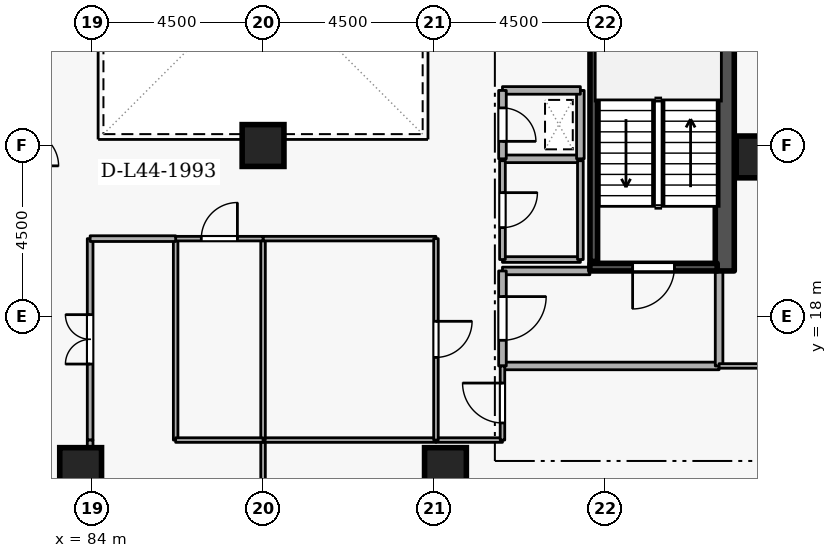
"""IFC4 building model, lengths in metres.
Left out: names, types, materials, properties, quantities, classifications, styles, units other than length and angle.
Written with IfcOpenShell. Run it as: python <this file> out.ifc"""

import sys

from ifc_helpers import new_model, si_unit, direction, frame, frame_2d, origin, origin_2d, place, context, subcontext, project, spatial, rectangle, extrude, element, fill, save


model = new_model("IFC4")
c1 = context("Model", 3, precision=1e-05, world=origin(), true_north=direction((0.0, 1.0)))
c2 = subcontext(c1, "Body", "Model", "MODEL_VIEW")
j1 = project(units=[si_unit("LENGTHUNIT", "METRE"), si_unit("PLANEANGLEUNIT", "RADIAN")], contexts=[c1])
p1 = place(None, origin())
s1 = spatial("IfcSite", under=j1, at=p1, CompositionType="ELEMENT")
p2 = place(p1, origin())
s2 = spatial("IfcBuilding", under=s1, at=p2, CompositionType="ELEMENT")
p3 = place(p2, frame((0.0, 0.0, 167.1)))
s3 = spatial("IfcBuildingStorey", under=s2, at=p3, CompositionType="ELEMENT", Elevation=167.1)
p4 = place(p3, frame((100.65, 19.2, 0.0), z_axis=(0.0, 0.0, 1.0), x_axis=(0.0, 1.0, 0.0)))
e1 = element("IfcWall", 1, at=p4, inside=s3, PredefinedType="SHEAR", context=c2, shape_type="SweptSolid", body=[
    extrude(rectangle(XDim=15.6, YDim=0.5, at=frame_2d((7.8, 0.0))), origin(), (0.0, 0.0, 1.0), 3.6),
])
for number, where, z_axis, x_axis in (
    (2, (93.3, 14.0, 0.0), (0.0, 0.0, 1.0), (1.0, 0.0, 0.0)),
    (3, (83.7, 14.0, 0.0), (0.0, 0.0, 1.0), (1.0, 0.0, 0.0)),
    (4, (101.5, 22.2, 0.0), (0.0, 0.0, 1.0), (1.0, 0.0, 0.0)),
    (5, (88.5, 22.5, 0.0), (0.0, 0.0, 1.0), (1.0, 0.0, 0.0)),
):
    element("IfcColumn", number, at=place(p3, frame(where, z_axis=z_axis, x_axis=x_axis)), inside=s3, PredefinedType="COLUMN", context=c2, shape_type="SweptSolid", body=[
        extrude(rectangle(XDim=1.1, YDim=1.1, at=origin_2d()), origin(), (0.0, 0.0, 1.0), 3.6),
    ])
p5 = place(p3, frame((100.45, 19.3, 0.0), z_axis=(0.0, 0.0, 1.0), x_axis=(-1.0, 0.0, 0.0)))
e6 = element("IfcWall", 6, at=p5, inside=s3, PredefinedType="SHEAR", context=c2, shape_type="SweptSolid", body=[
    extrude(rectangle(XDim=3.35, YDim=0.2, at=frame_2d((1.675, 0.0))), origin(), (0.0, 0.0, 1.0), 3.6),
])
p6 = place(p5, frame((1.125, 0.0, 0.0)))
e7 = element("IfcOpeningElement", 7, at=p6, cuts=e6, PredefinedType="OPENING", context=c2, shape_type="SweptSolid", body=[
    extrude(rectangle(XDim=1.1, YDim=2.1, at=frame_2d((0.55, 1.05))), frame((0.0, 0.11, 0.0), z_axis=(0.0, -1.0, 0.0), x_axis=(1.0, 0.0, 0.0)), (0.0, 0.0, 1.0), 0.22),
])
p7 = place(p3, frame((97.203, 26.55, 0.0), z_axis=(0.0, 0.0, 1.0), x_axis=(0.0, -1.0, 0.0)))
e8 = element("IfcWall", 8, at=p7, inside=s3, PredefinedType="SHEAR", context=c2, shape_type="SweptSolid", body=[
    extrude(rectangle(XDim=7.1, YDim=0.2, at=frame_2d((3.55, 0.0))), origin(), (0.0, 0.0, 1.0), 3.6),
])
p8 = place(p3, frame((94.8, 16.7, 0.0), z_axis=(0.0, 0.0, 1.0), x_axis=(1.0, 0.0, 0.0)))
e9 = element("IfcWall", 9, at=p8, inside=s3, PredefinedType="STANDARD", context=c2, shape_type="SweptSolid", body=[
    extrude(rectangle(XDim=5.7, YDim=0.2, at=frame_2d((2.85, 0.0))), origin(), (0.0, 0.0, 1.0), 3.34),
])
p9 = place(p3, frame((100.5, 16.7, 0.0), z_axis=(0.0, 0.0, 1.0), x_axis=(0.0, 1.0, 0.0)))
e10 = element("IfcWall", 10, at=p9, inside=s3, PredefinedType="STANDARD", context=c2, shape_type="SweptSolid", body=[
    extrude(rectangle(XDim=2.5, YDim=0.2, at=frame_2d((1.25, 0.0))), origin(), (0.0, 0.0, 1.0), 3.34),
])
p10 = place(p3, frame((97.1, 19.2, 0.0), z_axis=(0.0, 0.0, 1.0), x_axis=(-1.0, 0.0, 0.0)))
e11 = element("IfcWall", 11, at=p10, inside=s3, PredefinedType="STANDARD", context=c2, shape_type="SweptSolid", body=[
    extrude(rectangle(XDim=2.3, YDim=0.2, at=frame_2d((1.15, 0.0))), origin(), (0.0, 0.0, 1.0), 2.545),
])
p11 = place(p3, frame((94.8, 19.2, 0.0), z_axis=(0.0, 0.0, 1.0), x_axis=(0.0, -1.0, 0.0)))
e12 = element("IfcWall", 12, at=p11, inside=s3, PredefinedType="STANDARD", context=c2, shape_type="SweptSolid", body=[
    extrude(rectangle(XDim=2.5, YDim=0.2, at=frame_2d((1.25, 0.0))), origin(), (0.0, 0.0, 1.0), 3.34),
])
p12 = place(p11, frame((0.675, 0.0, 0.0)))
e13 = element("IfcOpeningElement", 13, at=p12, cuts=e12, PredefinedType="OPENING", context=c2, shape_type="SweptSolid", body=[
    extrude(rectangle(XDim=1.15, YDim=2.1, at=frame_2d((0.575, 1.05))), frame((0.0, 0.11, 0.0), z_axis=(0.0, -1.0, 0.0), x_axis=(1.0, 0.0, 0.0)), (0.0, 0.0, 1.0), 0.22),
])
p13 = place(p3, frame((94.8, 22.15, 0.0), z_axis=(0.0, 0.0, 1.0), x_axis=(1.0, 0.0, 0.0)))
e14 = element("IfcWall", 14, at=p13, inside=s3, PredefinedType="STANDARD", context=c2, shape_type="SweptSolid", body=[
    extrude(rectangle(XDim=2.05, YDim=0.2, at=frame_2d((1.025, 0.0))), origin(), (0.0, 0.0, 1.0), 3.34),
])
p14 = place(p3, frame((96.85, 22.15, 0.0), z_axis=(0.0, 0.0, 1.0), x_axis=(0.0, 1.0, 0.0)))
e15 = element("IfcWall", 15, at=p14, inside=s3, PredefinedType="STANDARD", context=c2, shape_type="SweptSolid", body=[
    extrude(rectangle(XDim=1.8, YDim=0.2, at=frame_2d((0.9, 0.0))), origin(), (0.0, 0.0, 1.0), 3.34),
])
p15 = place(p3, frame((96.85, 23.95, 0.0), z_axis=(0.0, 0.0, 1.0), x_axis=(-1.0, 0.0, 0.0)))
e16 = element("IfcWall", 16, at=p15, inside=s3, PredefinedType="STANDARD", context=c2, shape_type="SweptSolid", body=[
    extrude(rectangle(XDim=2.05, YDim=0.2, at=frame_2d((1.025, 0.0))), origin(), (0.0, 0.0, 1.0), 3.34),
])
p16 = place(p3, frame((94.8, 23.95, 0.0), z_axis=(0.0, 0.0, 1.0), x_axis=(0.0, -1.0, 0.0)))
e17 = element("IfcWall", 17, at=p16, inside=s3, PredefinedType="STANDARD", context=c2, shape_type="SweptSolid", body=[
    extrude(rectangle(XDim=1.8, YDim=0.2, at=frame_2d((0.9, 0.0))), origin(), (0.0, 0.0, 1.0), 3.34),
])
p17 = place(p16, frame((0.46, 0.0, 0.0)))
e18 = element("IfcOpeningElement", 18, at=p17, cuts=e17, PredefinedType="OPENING", context=c2, shape_type="SweptSolid", body=[
    extrude(rectangle(XDim=0.88, YDim=2.04, at=frame_2d((0.44, 1.02))), frame((0.0, 0.11, 0.0), z_axis=(0.0, -1.0, 0.0), x_axis=(1.0, 0.0, 0.0)), (0.0, 0.0, 1.0), 0.22),
])
p18 = place(p3, frame((94.8, 19.5, 0.0), z_axis=(0.0, 0.0, 1.0), x_axis=(1.0, 0.0, 0.0)))
e19 = element("IfcWall", 19, at=p18, inside=s3, PredefinedType="PARTITIONING", context=c2, shape_type="SweptSolid", body=[
    extrude(rectangle(XDim=2.05, YDim=0.15, at=frame_2d((1.025, 0.0))), origin(), (0.0, 0.0, 1.0), 2.545),
])
p19 = place(p3, frame((96.85, 19.5, 0.0), z_axis=(0.0, 0.0, 1.0), x_axis=(0.0, 1.0, 0.0)))
e20 = element("IfcWall", 20, at=p19, inside=s3, PredefinedType="PARTITIONING", context=c2, shape_type="SweptSolid", body=[
    extrude(rectangle(XDim=2.6, YDim=0.15, at=frame_2d((1.3, 0.0))), origin(), (0.0, 0.0, 1.0), 3.34),
])
p20 = place(p3, frame((94.8, 22.1, 0.0), z_axis=(0.0, 0.0, 1.0), x_axis=(0.0, -1.0, 0.0)))
e21 = element("IfcWall", 21, at=p20, inside=s3, PredefinedType="PARTITIONING", context=c2, shape_type="SweptSolid", body=[
    extrude(rectangle(XDim=2.6, YDim=0.15, at=frame_2d((1.3, 0.0))), origin(), (0.0, 0.0, 1.0), 3.34),
])
p21 = place(p20, frame((0.84, 0.0, 0.0)))
e22 = element("IfcOpeningElement", 22, at=p21, cuts=e21, PredefinedType="OPENING", context=c2, shape_type="SweptSolid", body=[
    extrude(rectangle(XDim=0.92, YDim=2.08, at=frame_2d((0.46, 1.04))), frame((0.0, 0.085, 0.0), z_axis=(0.0, -1.0, 0.0), x_axis=(1.0, 0.0, 0.0)), (0.0, 0.0, 1.0), 0.17),
])
p22 = place(p3, frame((88.5, 9.28, 0.0), z_axis=(0.0, 0.0, 1.0), x_axis=(0.0, 1.0, 0.0)))
e23 = element("IfcWall", 23, at=p22, inside=s3, PredefinedType="PARTITIONING", context=c2, shape_type="SweptSolid", body=[
    extrude(rectangle(XDim=5.47, YDim=0.12, at=frame_2d((2.735, 0.0))), origin(), (0.0, 0.0, 1.0), 2.882),
])
p23 = place(p3, frame((88.5, 14.75, 0.0), z_axis=(0.0, 0.0, 1.0), x_axis=(1.0, 0.0, 0.0)))
e24 = element("IfcWall", 24, at=p23, inside=s3, PredefinedType="PARTITIONING", context=c2, shape_type="SweptSolid", body=[
    extrude(rectangle(XDim=4.55, YDim=0.12, at=frame_2d((2.275, 0.0))), origin(), (0.0, 0.0, 1.0), 3.34),
])
p24 = place(p3, frame((93.05, 14.75, 0.0), z_axis=(0.0, 0.0, 1.0), x_axis=(1.0, 0.0, 0.0)))
e25 = element("IfcWall", 25, at=p24, inside=s3, PredefinedType="PARTITIONING", context=c2, shape_type="SweptSolid", body=[
    extrude(rectangle(XDim=1.75, YDim=0.12, at=frame_2d((0.875, 0.0))), origin(), (0.0, 0.0, 1.0), 3.34),
])
p25 = place(p3, frame((94.8, 14.75, 0.0), z_axis=(0.0, 0.0, 1.0), x_axis=(0.0, 1.0, 0.0)))
e26 = element("IfcWall", 26, at=p25, inside=s3, PredefinedType="PARTITIONING", context=c2, shape_type="SweptSolid", body=[
    extrude(rectangle(XDim=1.95, YDim=0.12, at=frame_2d((0.975, 0.0))), origin(), (0.0, 0.0, 1.0), 3.34),
])
p26 = place(p25, frame((0.45, 0.0, 0.0)))
e27 = element("IfcOpeningElement", 27, at=p26, cuts=e26, PredefinedType="OPENING", context=c2, shape_type="SweptSolid", body=[
    extrude(rectangle(XDim=1.05, YDim=2.1, at=frame_2d((0.525, 1.05))), frame((0.0, 0.07, 0.0), z_axis=(0.0, -1.0, 0.0), x_axis=(1.0, 0.0, 0.0)), (0.0, 0.0, 1.0), 0.14),
])
p27 = place(p3, frame((100.5, 16.7, 0.0), z_axis=(0.0, 0.0, 1.0), x_axis=(1.0, 0.0, 0.0)))
e28 = element("IfcWall", 28, at=p27, inside=s3, PredefinedType="PARTITIONING", context=c2, shape_type="SweptSolid", body=[
    extrude(rectangle(XDim=11.72, YDim=0.12, at=frame_2d((5.86, 0.0))), origin(), (0.0, 0.0, 1.0), 3.34),
])
p28 = place(p3, frame((88.5, 14.75, 0.0), z_axis=(0.0, 0.0, 1.0), x_axis=(0.0, 1.0, 0.0)))
e29 = element("IfcWall", 29, at=p28, inside=s3, PredefinedType="PARTITIONING", context=c2, shape_type="SweptSolid", body=[
    extrude(rectangle(XDim=5.3, YDim=0.12, at=frame_2d((2.65, 0.0))), origin(), (0.0, 0.0, 1.0), 2.882),
])
p29 = place(p3, frame((88.5, 20.05, 0.0), z_axis=(0.0, 0.0, 1.0), x_axis=(1.0, 0.0, 0.0)))
e30 = element("IfcWall", 30, at=p29, inside=s3, PredefinedType="PARTITIONING", context=c2, shape_type="SweptSolid", body=[
    extrude(rectangle(XDim=4.55, YDim=0.12, at=frame_2d((2.275, 0.0))), origin(), (0.0, 0.0, 1.0), 3.34),
])
p30 = place(p3, frame((93.05, 20.05, 0.0), z_axis=(0.0, 0.0, 1.0), x_axis=(0.0, -1.0, 0.0)))
e31 = element("IfcWall", 31, at=p30, inside=s3, PredefinedType="PARTITIONING", context=c2, shape_type="SweptSolid", body=[
    extrude(rectangle(XDim=5.3, YDim=0.12, at=frame_2d((2.65, 0.0))), origin(), (0.0, 0.0, 1.0), 3.34),
])
p31 = place(p30, frame((2.175, 0.0, 0.0)))
e32 = element("IfcOpeningElement", 32, at=p31, cuts=e31, PredefinedType="OPENING", context=c2, shape_type="SweptSolid", body=[
    extrude(rectangle(XDim=0.95, YDim=2.1, at=frame_2d((0.475, 1.05))), frame((0.0, 0.07, 0.0), z_axis=(0.0, -1.0, 0.0), x_axis=(1.0, 0.0, 0.0)), (0.0, 0.0, 1.0), 0.14),
])
p32 = place(p3, frame((86.2, 14.75, 0.0), z_axis=(0.0, 0.0, 1.0), x_axis=(0.0, 1.0, 0.0)))
e33 = element("IfcWall", 33, at=p32, inside=s3, PredefinedType="PARTITIONING", context=c2, shape_type="SweptSolid", body=[
    extrude(rectangle(XDim=5.3, YDim=0.12, at=frame_2d((2.65, 0.0))), origin(), (0.0, 0.0, 1.0), 3.34),
])
p33 = place(p3, frame((86.2, 20.05, 0.0), z_axis=(0.0, 0.0, 1.0), x_axis=(1.0, 0.0, 0.0)))
e34 = element("IfcWall", 34, at=p33, inside=s3, PredefinedType="PARTITIONING", context=c2, shape_type="SweptSolid", body=[
    extrude(rectangle(XDim=2.3, YDim=0.12, at=frame_2d((1.15, 0.0))), origin(), (0.0, 0.0, 1.0), 3.34),
])
p34 = place(p33, frame((0.675, 0.0, 0.0)))
e35 = element("IfcOpeningElement", 35, at=p34, cuts=e34, PredefinedType="OPENING", context=c2, shape_type="SweptSolid", body=[
    extrude(rectangle(XDim=0.95, YDim=2.1, at=frame_2d((0.475, 1.05))), frame((0.0, 0.07, 0.0), z_axis=(0.0, -1.0, 0.0), x_axis=(1.0, 0.0, 0.0)), (0.0, 0.0, 1.0), 0.14),
])
p35 = place(p3, frame((88.5, 14.75, 0.0), z_axis=(0.0, 0.0, 1.0), x_axis=(-1.0, 0.0, 0.0)))
e36 = element("IfcWall", 36, at=p35, inside=s3, PredefinedType="PARTITIONING", context=c2, shape_type="SweptSolid", body=[
    extrude(rectangle(XDim=2.3, YDim=0.12, at=frame_2d((1.15, 0.0))), origin(), (0.0, 0.0, 1.0), 3.34),
])
p36 = place(p3, frame((83.95, 14.75, 0.0), z_axis=(0.0, 0.0, 1.0), x_axis=(0.0, 1.0, 0.0)))
e37 = element("IfcWall", 37, at=p36, inside=s3, PredefinedType="PARTITIONING", context=c2, shape_type="SweptSolid", body=[
    extrude(rectangle(XDim=5.3, YDim=0.15, at=frame_2d((2.65, 0.0))), origin(), (0.0, 0.0, 1.0), 3.34),
])
p37 = place(p36, frame((2.0, 0.0, 0.0)))
e38 = element("IfcOpeningElement", 38, at=p37, cuts=e37, PredefinedType="OPENING", context=c2, shape_type="SweptSolid", body=[
    extrude(rectangle(XDim=1.3, YDim=2.12, at=frame_2d((0.65, 1.06))), frame((0.0, 0.085, 0.0), z_axis=(0.0, -1.0, 0.0), x_axis=(1.0, 0.0, 0.0)), (0.0, 0.0, 1.0), 0.17),
])
p38 = place(p3, frame((83.95, 20.05, 0.0), z_axis=(0.0, 0.0, 1.0), x_axis=(1.0, 0.0, 0.0)))
e39 = element("IfcWall", 39, at=p38, inside=s3, PredefinedType="PARTITIONING", context=c2, shape_type="SweptSolid", body=[
    extrude(rectangle(XDim=2.25, YDim=0.15, at=frame_2d((1.125, 0.0))), origin(), (0.0, 0.0, 1.0), 3.34),
])
p39 = place(p3, frame((83.95, 12.4, 0.0), z_axis=(0.0, 0.0, 1.0), x_axis=(0.0, 1.0, 0.0)))
e40 = element("IfcWall", 40, at=p39, inside=s3, PredefinedType="PARTITIONING", context=c2, shape_type="SweptSolid", body=[
    extrude(rectangle(XDim=2.35, YDim=0.15, at=frame_2d((1.175, 0.0))), origin(), (0.0, 0.0, 1.0), 3.34),
])
p40 = place(p6, origin())
e41 = element("IfcDoor", 41, at=p40, inside=s3, OperationType="SINGLE_SWING_RIGHT", PredefinedType="DOOR", context=c2, shape_type="SweptSolid", body=[
    extrude(rectangle(XDim=1.1, YDim=2.1, at=frame_2d((0.55, 1.05))), frame((0.0, 0.025, 0.0), z_axis=(0.0, -1.0, 0.0), x_axis=(1.0, 0.0, 0.0)), (0.0, 0.0, 1.0), 0.05),
])
fill(e7, e41)
p41 = place(p12, origin())
e42 = element("IfcDoor", 42, at=p41, inside=s3, OperationType="SINGLE_SWING_LEFT", PredefinedType="DOOR", context=c2, shape_type="SweptSolid", body=[
    extrude(rectangle(XDim=1.15, YDim=2.1, at=frame_2d((0.575, 1.05))), frame((0.0, 0.025, 0.0), z_axis=(0.0, -1.0, 0.0), x_axis=(1.0, 0.0, 0.0)), (0.0, 0.0, 1.0), 0.05),
])
fill(e13, e42)
p42 = place(p17, origin())
e43 = element("IfcDoor", 43, at=p42, inside=s3, OperationType="SINGLE_SWING_RIGHT", PredefinedType="DOOR", context=c2, shape_type="SweptSolid", body=[
    extrude(rectangle(XDim=0.88, YDim=2.04, at=frame_2d((0.44, 1.02))), frame((0.0, 0.025, 0.0), z_axis=(0.0, -1.0, 0.0), x_axis=(1.0, 0.0, 0.0)), (0.0, 0.0, 1.0), 0.05),
])
fill(e18, e43)
p43 = place(p21, origin())
e44 = element("IfcDoor", 44, at=p43, inside=s3, OperationType="SINGLE_SWING_LEFT", PredefinedType="DOOR", context=c2, shape_type="SweptSolid", body=[
    extrude(rectangle(XDim=0.92, YDim=2.08, at=frame_2d((0.46, 1.04))), frame((0.0, 0.025, 0.0), z_axis=(0.0, -1.0, 0.0), x_axis=(1.0, 0.0, 0.0)), (0.0, 0.0, 1.0), 0.05),
])
fill(e22, e44)
p44 = place(p26, origin())
e45 = element("IfcDoor", 45, at=p44, inside=s3, OperationType="SINGLE_SWING_RIGHT", PredefinedType="DOOR", context=c2, shape_type="SweptSolid", body=[
    extrude(rectangle(XDim=1.05, YDim=2.1, at=frame_2d((0.525, 1.05))), frame((0.0, 0.025, 0.0), z_axis=(0.0, -1.0, 0.0), x_axis=(1.0, 0.0, 0.0)), (0.0, 0.0, 1.0), 0.05),
])
fill(e27, e45)
p45 = place(p31, origin())
e46 = element("IfcDoor", 46, at=p45, inside=s3, OperationType="SINGLE_SWING_LEFT", PredefinedType="DOOR", context=c2, shape_type="SweptSolid", body=[
    extrude(rectangle(XDim=0.95, YDim=2.1, at=frame_2d((0.475, 1.05))), frame((0.0, 0.025, 0.0), z_axis=(0.0, -1.0, 0.0), x_axis=(1.0, 0.0, 0.0)), (0.0, 0.0, 1.0), 0.05),
])
fill(e32, e46)
p46 = place(p34, origin())
e47 = element("IfcDoor", 47, at=p46, inside=s3, OperationType="SINGLE_SWING_RIGHT", PredefinedType="DOOR", context=c2, shape_type="SweptSolid", body=[
    extrude(rectangle(XDim=0.95, YDim=2.1, at=frame_2d((0.475, 1.05))), frame((0.0, 0.025, 0.0), z_axis=(0.0, -1.0, 0.0), x_axis=(1.0, 0.0, 0.0)), (0.0, 0.0, 1.0), 0.05),
])
fill(e35, e47)
p47 = place(p37, origin())
e48 = element("IfcDoor", 48, at=p47, inside=s3, OperationType="DOUBLE_DOOR_SINGLE_SWING", PredefinedType="DOOR", context=c2, shape_type="SweptSolid", body=[
    extrude(rectangle(XDim=1.3, YDim=2.12, at=frame_2d((0.65, 1.06))), frame((0.0, 0.025, 0.0), z_axis=(0.0, -1.0, 0.0), x_axis=(1.0, 0.0, 0.0)), (0.0, 0.0, 1.0), 0.05),
])
fill(e38, e48)
save(model, sys.argv[1])
